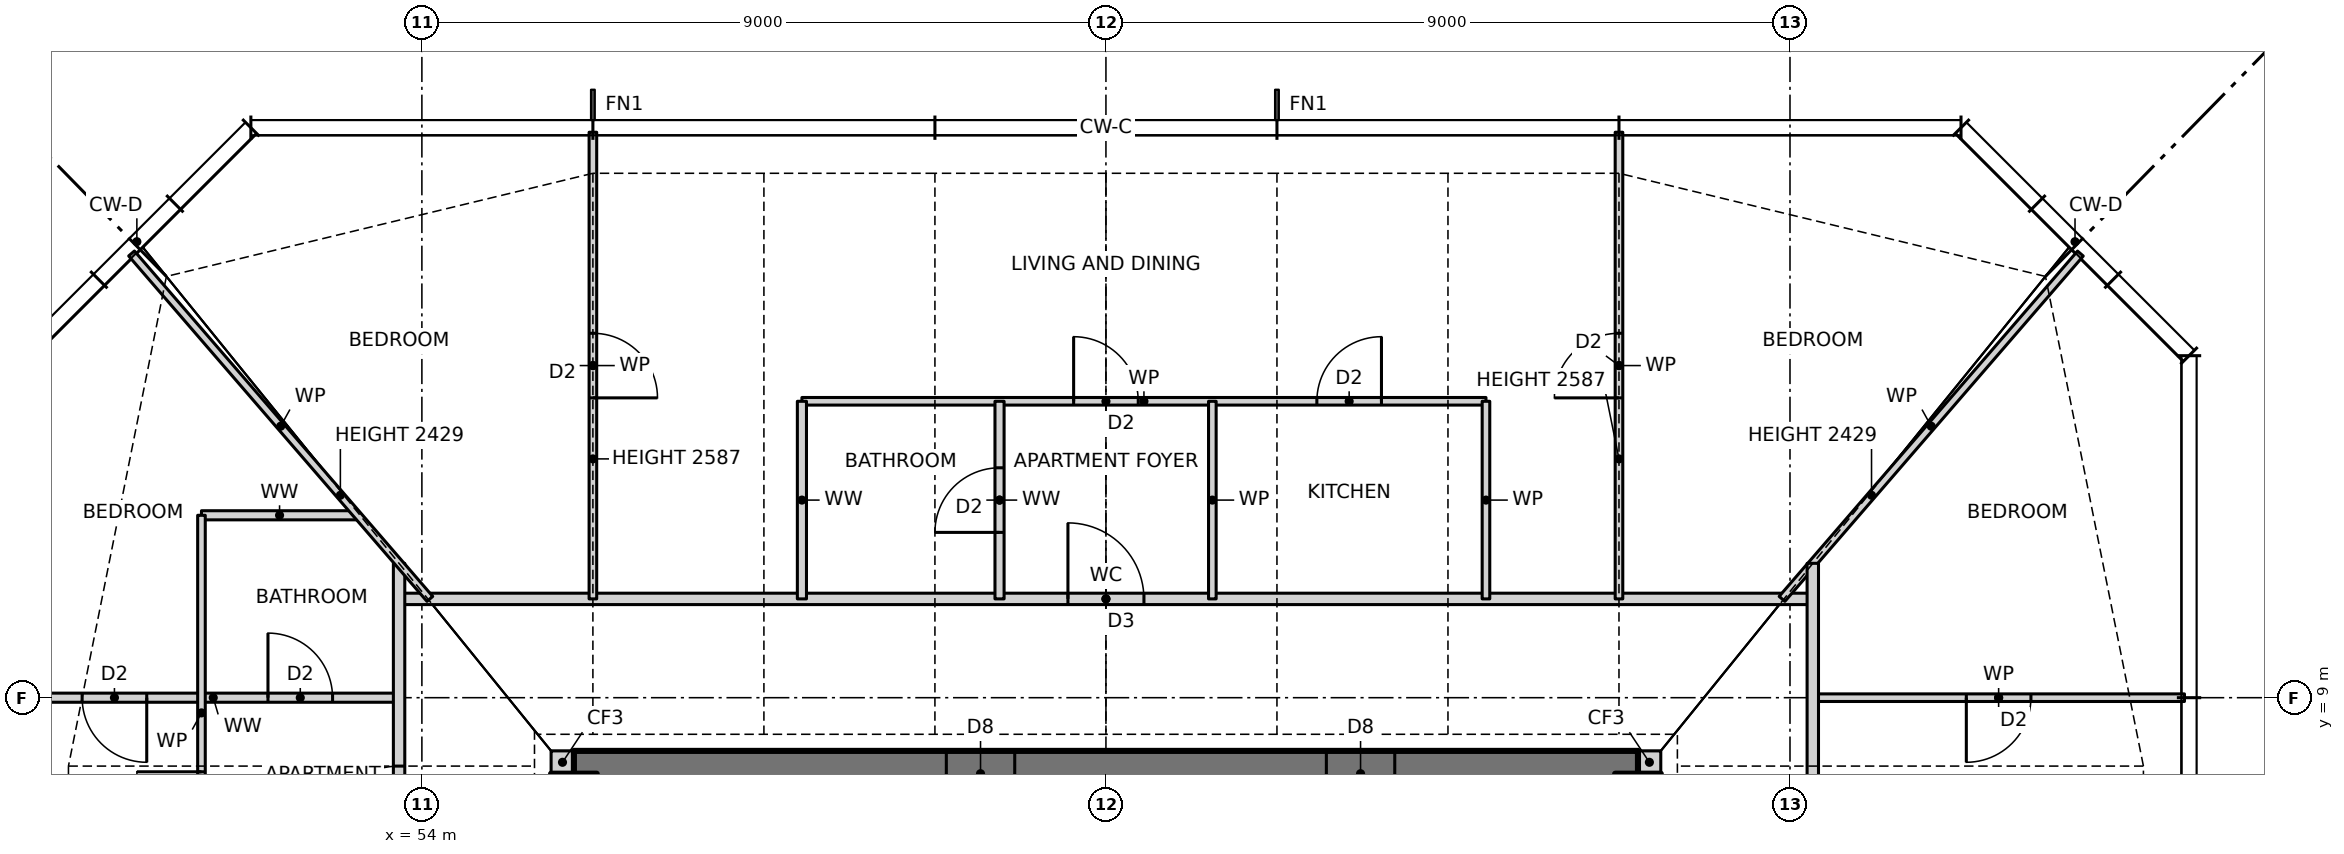
"""IFC4 building model, lengths in metres.
Left out: names, types, materials, properties, quantities, classifications, styles, units other than length and angle.
Written with IfcOpenShell. Run it as: python <this file> out.ifc"""

import sys

from ifc_helpers import new_model, si_unit, direction, frame, frame_2d, origin, place, context, subcontext, project, spatial, rectangle, extrude, element, fill, save


model = new_model("IFC4")
c1 = context("Model", 3, precision=1e-05, world=origin(), true_north=direction((0.0, 1.0)))
c2 = subcontext(c1, "Body", "Model", "MODEL_VIEW")
j1 = project(units=[si_unit("LENGTHUNIT", "METRE"), si_unit("PLANEANGLEUNIT", "RADIAN")], contexts=[c1])
p1 = place(None, origin())
s1 = spatial("IfcSite", under=j1, at=p1, CompositionType="ELEMENT")
p2 = place(p1, origin())
s2 = spatial("IfcBuilding", under=s1, at=p2, CompositionType="ELEMENT")
p3 = place(p2, frame((0.0, 0.0, 80.5)))
s3 = spatial("IfcBuildingStorey", under=s2, at=p3, CompositionType="ELEMENT", Elevation=80.5)
for number, where, z_axis, x_axis in (
    (1, (70.0, 8.15, 0.0), (0.0, 0.0, 1.0), (1.0, 0.0, 0.0)),
    (2, (55.7, 8.15, 0.0), (0.0, 0.0, 1.0), (1.0, 0.0, 0.0)),
):
    element("IfcWall", number, at=place(p3, frame(where, z_axis=z_axis, x_axis=x_axis)), inside=s3, PredefinedType="SOLIDWALL", context=c2, shape_type="SweptSolid", body=[
        extrude(rectangle(XDim=0.3, YDim=0.3, at=frame_2d((0.15, 0.0))), origin(), (0.0, 0.0, 1.0), 3.5),
    ])
p4 = place(p3, frame((70.0, 8.0, 0.0), z_axis=(0.0, 0.0, 1.0), x_axis=(-1.0, 0.0, 0.0)))
e3 = element("IfcWall", 3, at=p4, inside=s3, PredefinedType="SHEAR", context=c2, shape_type="SweptSolid", body=[
    extrude(rectangle(XDim=14.0, YDim=0.6, at=frame_2d((7.0, 0.0))), origin(), (0.0, 0.0, 1.0), 3.5),
])
p5 = place(p4, frame((8.2, 0.0, 0.0)))
e4 = element("IfcOpeningElement", 4, at=p5, cuts=e3, PredefinedType="OPENING", context=c2, shape_type="SweptSolid", body=[
    extrude(rectangle(XDim=0.9, YDim=2.1, at=frame_2d((0.45, 1.05))), frame((0.0, 0.31, 0.0), z_axis=(0.0, -1.0, 0.0), x_axis=(1.0, 0.0, 0.0)), (0.0, 0.0, 1.0), 0.62),
])
p6 = place(p4, frame((3.2, 0.0, 0.0)))
e5 = element("IfcOpeningElement", 5, at=p6, cuts=e3, PredefinedType="OPENING", context=c2, shape_type="SweptSolid", body=[
    extrude(rectangle(XDim=0.9, YDim=2.1, at=frame_2d((0.45, 1.05))), frame((0.0, 0.31, 0.0), z_axis=(0.0, -1.0, 0.0), x_axis=(1.0, 0.0, 0.0)), (0.0, 0.0, 1.0), 0.62),
])
p7 = place(p3, frame((48.81, 9.0, 0.0), z_axis=(0.0, 0.0, 1.0), x_axis=(1.0, 0.0, 0.0)))
e6 = element("IfcWall", 6, at=p7, inside=s3, PredefinedType="PARTITIONING", context=c2, shape_type="SweptSolid", body=[
    extrude(rectangle(XDim=4.89, YDim=0.12, at=frame_2d((2.445, 0.0))), origin(), (0.0, 0.0, 1.0), 3.27),
])
p8 = place(p7, frame((3.165, 0.0, 0.0)))
e7 = element("IfcOpeningElement", 7, at=p8, cuts=e6, PredefinedType="OPENING", context=c2, shape_type="SweptSolid", body=[
    extrude(rectangle(XDim=0.85, YDim=2.1, at=frame_2d((0.425, 1.05))), frame((0.0, 0.07, 0.0), z_axis=(0.0, -1.0, 0.0), x_axis=(1.0, 0.0, 0.0)), (0.0, 0.0, 1.0), 0.14),
])
p9 = place(p7, frame((0.72, 0.0, 0.0)))
e8 = element("IfcOpeningElement", 8, at=p9, cuts=e6, PredefinedType="OPENING", context=c2, shape_type="SweptSolid", body=[
    extrude(rectangle(XDim=0.85, YDim=2.1, at=frame_2d((0.425, 1.05))), frame((0.0, 0.07, 0.0), z_axis=(0.0, -1.0, 0.0), x_axis=(1.0, 0.0, 0.0)), (0.0, 0.0, 1.0), 0.14),
])
p10 = place(p3, frame((72.3, 9.0, 0.0), z_axis=(0.0, 0.0, 1.0), x_axis=(1.0, 0.0, 0.0)))
e9 = element("IfcWall", 9, at=p10, inside=s3, PredefinedType="PARTITIONING", context=c2, shape_type="SweptSolid", body=[
    extrude(rectangle(XDim=4.89, YDim=0.1, at=frame_2d((2.445, 0.0))), origin(), (0.0, 0.0, 1.0), 3.27),
])
p11 = place(p10, frame((2.02, 0.0, 0.0)))
e10 = element("IfcOpeningElement", 10, at=p11, cuts=e9, PredefinedType="OPENING", context=c2, shape_type="SweptSolid", body=[
    extrude(rectangle(XDim=0.85, YDim=2.1, at=frame_2d((0.425, 1.05))), frame((0.0, 0.06, 0.0), z_axis=(0.0, -1.0, 0.0), x_axis=(1.0, 0.0, 0.0)), (0.0, 0.0, 1.0), 0.12),
])
p12 = place(p3, frame((53.7, 10.3, 0.0), z_axis=(0.0, 0.0, 1.0), x_axis=(1.0, 0.0, 0.0)))
e11 = element("IfcWall", 11, at=p12, inside=s3, PredefinedType="PARTITIONING", context=c2, shape_type="SweptSolid", body=[
    extrude(rectangle(XDim=18.6, YDim=0.15, at=frame_2d((9.3, 0.0))), origin(), (0.0, 0.0, 1.0), 3.27),
])
p13 = place(p12, frame((8.8, 0.0, 0.0)))
e12 = element("IfcOpeningElement", 12, at=p13, cuts=e11, PredefinedType="OPENING", context=c2, shape_type="SweptSolid", body=[
    extrude(rectangle(XDim=1.0, YDim=2.1, at=frame_2d((0.5, 1.05))), frame((0.0, 0.085, 0.0), z_axis=(0.0, -1.0, 0.0), x_axis=(1.0, 0.0, 0.0)), (0.0, 0.0, 1.0), 0.17),
])
p14 = place(p3, frame((51.1, 11.4, 0.0), z_axis=(0.0, 0.0, 1.0), x_axis=(1.0, 0.0, 0.0)))
e13 = element("IfcWall", 13, at=p14, inside=s3, PredefinedType="PARTITIONING", context=c2, shape_type="SweptSolid", body=[
    extrude(rectangle(XDim=2.055, YDim=0.12, at=frame_2d((1.027, 0.0))), origin(), (0.0, 0.0, 1.0), 3.27),
])
p15 = place(p3, frame((59.0, 12.9, 0.0), z_axis=(0.0, 0.0, 1.0), x_axis=(1.0, 0.0, 0.0)))
e14 = element("IfcWall", 14, at=p15, inside=s3, PredefinedType="PARTITIONING", context=c2, shape_type="SweptSolid", body=[
    extrude(rectangle(XDim=9.0, YDim=0.1, at=frame_2d((4.5, 0.0))), origin(), (0.0, 0.0, 1.0), 3.27),
])
p16 = place(p15, frame((6.775, 0.0, 0.0)))
e15 = element("IfcOpeningElement", 15, at=p16, cuts=e14, PredefinedType="OPENING", context=c2, shape_type="SweptSolid", body=[
    extrude(rectangle(XDim=0.85, YDim=2.1, at=frame_2d((0.425, 1.05))), frame((0.0, 0.06, 0.0), z_axis=(0.0, -1.0, 0.0), x_axis=(1.0, 0.0, 0.0)), (0.0, 0.0, 1.0), 0.12),
])
p17 = place(p15, frame((3.575, 0.0, 0.0)))
e16 = element("IfcOpeningElement", 16, at=p17, cuts=e14, PredefinedType="OPENING", context=c2, shape_type="SweptSolid", body=[
    extrude(rectangle(XDim=0.85, YDim=2.1, at=frame_2d((0.425, 1.05))), frame((0.0, 0.06, 0.0), z_axis=(0.0, -1.0, 0.0), x_axis=(1.0, 0.0, 0.0)), (0.0, 0.0, 1.0), 0.12),
])
p18 = place(p3, frame((71.895, 10.3, 0.0), z_axis=(0.0, 0.0, 1.0), x_axis=(0.65378286253, 0.756682211144, 0.0)))
e17 = element("IfcWall", 17, at=p18, inside=s3, PredefinedType="PARTITIONING", context=c2, shape_type="SweptSolid", body=[
    extrude(rectangle(XDim=6.005, YDim=0.1, at=frame_2d((3.002, 0.0))), origin(), (0.0, 0.0, 1.0), 2.429),
])
p19 = place(p3, frame((72.3, -10.9, 0.0), z_axis=(0.0, 0.0, 1.0), x_axis=(0.0, 1.0, 0.0)))
e18 = element("IfcWall", 18, at=p19, inside=s3, PredefinedType="PARTITIONING", context=c2, shape_type="SweptSolid", body=[
    extrude(rectangle(XDim=21.668, YDim=0.15, at=frame_2d((10.834, 0.0))), origin(), (0.0, 0.0, 1.0), 3.27),
])
p20 = place(p19, frame((10.4, 0.0, 0.0)))
e19 = element("IfcOpeningElement", 19, at=p20, cuts=e18, PredefinedType="OPENING", context=c2, shape_type="SweptSolid", body=[
    extrude(rectangle(XDim=1.0, YDim=2.1, at=frame_2d((0.5, 1.05))), frame((0.0, 0.085, 0.0), z_axis=(0.0, -1.0, 0.0), x_axis=(1.0, 0.0, 0.0)), (0.0, 0.0, 1.0), 0.17),
])
p21 = place(p3, frame((69.75, 10.3, 0.0), z_axis=(0.0, 0.0, 1.0), x_axis=(0.0, 1.0, 0.0)))
e20 = element("IfcWall", 20, at=p21, inside=s3, PredefinedType="PARTITIONING", context=c2, shape_type="SweptSolid", body=[
    extrude(rectangle(XDim=6.14, YDim=0.1, at=frame_2d((3.07, 0.0))), origin(), (0.0, 0.0, 1.0), 2.587),
])
p22 = place(p21, frame((2.645, 0.0, 0.0)))
e21 = element("IfcOpeningElement", 21, at=p22, cuts=e20, PredefinedType="OPENING", context=c2, shape_type="SweptSolid", body=[
    extrude(rectangle(XDim=0.85, YDim=2.1, at=frame_2d((0.425, 1.05))), frame((0.0, 0.06, 0.0), z_axis=(0.0, -1.0, 0.0), x_axis=(1.0, 0.0, 0.0)), (0.0, 0.0, 1.0), 0.12),
])
for number, where, z_axis, x_axis in (
    (22, (68.0, 10.3, 0.0), (0.0, 0.0, 1.0), (0.0, 1.0, 0.0)),
    (23, (64.4, 10.3, 0.0), (0.0, 0.0, 1.0), (0.0, 1.0, 0.0)),
):
    element("IfcWall", number, at=place(p3, frame(where, z_axis=z_axis, x_axis=x_axis)), inside=s3, PredefinedType="PARTITIONING", context=c2, shape_type="SweptSolid", body=[
        extrude(rectangle(XDim=2.6, YDim=0.1, at=frame_2d((1.3, 0.0))), origin(), (0.0, 0.0, 1.0), 3.27),
    ])
p23 = place(p3, frame((61.6, 10.3, 0.0), z_axis=(0.0, 0.0, 1.0), x_axis=(0.0, 1.0, 0.0)))
e24 = element("IfcWall", 24, at=p23, inside=s3, PredefinedType="PARTITIONING", context=c2, shape_type="SweptSolid", body=[
    extrude(rectangle(XDim=2.6, YDim=0.12, at=frame_2d((1.3, 0.0))), origin(), (0.0, 0.0, 1.0), 3.27),
])
p24 = place(p23, frame((0.875, 0.0, 0.0)))
e25 = element("IfcOpeningElement", 25, at=p24, cuts=e24, PredefinedType="OPENING", context=c2, shape_type="SweptSolid", body=[
    extrude(rectangle(XDim=0.85, YDim=2.1, at=frame_2d((0.425, 1.05))), frame((0.0, 0.07, 0.0), z_axis=(0.0, -1.0, 0.0), x_axis=(1.0, 0.0, 0.0)), (0.0, 0.0, 1.0), 0.14),
])
p25 = place(p3, frame((59.0, 10.3, 0.0), z_axis=(0.0, 0.0, 1.0), x_axis=(0.0, 1.0, 0.0)))
e26 = element("IfcWall", 26, at=p25, inside=s3, PredefinedType="PARTITIONING", context=c2, shape_type="SweptSolid", body=[
    extrude(rectangle(XDim=2.6, YDim=0.12, at=frame_2d((1.3, 0.0))), origin(), (0.0, 0.0, 1.0), 3.27),
])
p26 = place(p3, frame((56.25, 10.3, 0.0), z_axis=(0.0, 0.0, 1.0), x_axis=(0.0, 1.0, 0.0)))
e27 = element("IfcWall", 27, at=p26, inside=s3, PredefinedType="PARTITIONING", context=c2, shape_type="SweptSolid", body=[
    extrude(rectangle(XDim=6.14, YDim=0.1, at=frame_2d((3.07, 0.0))), origin(), (0.0, 0.0, 1.0), 2.587),
])
p27 = place(p26, frame((2.645, 0.0, 0.0)))
e28 = element("IfcOpeningElement", 28, at=p27, cuts=e27, PredefinedType="OPENING", context=c2, shape_type="SweptSolid", body=[
    extrude(rectangle(XDim=0.85, YDim=2.1, at=frame_2d((0.425, 1.05))), frame((0.0, 0.06, 0.0), z_axis=(0.0, -1.0, 0.0), x_axis=(1.0, 0.0, 0.0)), (0.0, 0.0, 1.0), 0.12),
])
p28 = place(p3, frame((53.7, -10.9, 0.0), z_axis=(0.0, 0.0, 1.0), x_axis=(0.0, 1.0, 0.0)))
e29 = element("IfcWall", 29, at=p28, inside=s3, PredefinedType="PARTITIONING", context=c2, shape_type="SweptSolid", body=[
    extrude(rectangle(XDim=21.668, YDim=0.15, at=frame_2d((10.834, 0.0))), origin(), (0.0, 0.0, 1.0), 3.27),
])
p29 = place(p28, frame((18.0, 0.0, 0.0)))
e30 = element("IfcOpeningElement", 30, at=p29, cuts=e29, PredefinedType="OPENING", context=c2, shape_type="SweptSolid", body=[
    extrude(rectangle(XDim=1.0, YDim=2.1, at=frame_2d((0.5, 1.05))), frame((0.0, 0.085, 0.0), z_axis=(0.0, -1.0, 0.0), x_axis=(1.0, 0.0, 0.0)), (0.0, 0.0, 1.0), 0.17),
])
p30 = place(p28, frame((5.4, 0.0, 0.0)))
e31 = element("IfcOpeningElement", 31, at=p30, cuts=e29, PredefinedType="OPENING", context=c2, shape_type="SweptSolid", body=[
    extrude(rectangle(XDim=1.0, YDim=2.1, at=frame_2d((0.5, 1.05))), frame((0.0, 0.085, 0.0), z_axis=(0.0, -1.0, 0.0), x_axis=(1.0, 0.0, 0.0)), (0.0, 0.0, 1.0), 0.17),
])
p31 = place(p3, frame((51.1, 6.2, 0.0), z_axis=(0.0, 0.0, 1.0), x_axis=(0.0, 1.0, 0.0)))
e32 = element("IfcWall", 32, at=p31, inside=s3, PredefinedType="PARTITIONING", context=c2, shape_type="SweptSolid", body=[
    extrude(rectangle(XDim=5.2, YDim=0.1, at=frame_2d((2.6, 0.0))), origin(), (0.0, 0.0, 1.0), 3.27),
])
p32 = place(p31, frame((0.975, 0.0, 0.0)))
e33 = element("IfcOpeningElement", 33, at=p32, cuts=e32, PredefinedType="OPENING", context=c2, shape_type="SweptSolid", body=[
    extrude(rectangle(XDim=0.85, YDim=2.1, at=frame_2d((0.425, 1.05))), frame((0.0, 0.06, 0.0), z_axis=(0.0, -1.0, 0.0), x_axis=(1.0, 0.0, 0.0)), (0.0, 0.0, 1.0), 0.12),
])
p33 = place(p3, frame((54.105, 10.3, 0.0), z_axis=(0.0, 0.0, 1.0), x_axis=(-0.653606109319, 0.756834892074, 0.0)))
e34 = element("IfcWall", 34, at=p33, inside=s3, PredefinedType="PARTITIONING", context=c2, shape_type="SweptSolid", body=[
    extrude(rectangle(XDim=6.005, YDim=0.1, at=frame_2d((3.002, 0.0))), origin(), (0.0, 0.0, 1.0), 2.429),
])
p34 = place(p11, frame((0.85, 0.0, 0.0), z_axis=(0.0, 0.0, 1.0), x_axis=(-1.0, 0.0, 0.0)))
e35 = element("IfcDoor", 35, at=p34, inside=s3, OperationType="SINGLE_SWING_RIGHT", PredefinedType="DOOR", context=c2, shape_type="SweptSolid", body=[
    extrude(rectangle(XDim=0.85, YDim=2.1, at=frame_2d((0.425, 1.05))), frame((0.0, 0.025, 0.0), z_axis=(0.0, -1.0, 0.0), x_axis=(1.0, 0.0, 0.0)), (0.0, 0.0, 1.0), 0.05),
])
fill(e10, e35)
p35 = place(p16, origin())
e36 = element("IfcDoor", 36, at=p35, inside=s3, OperationType="SINGLE_SWING_RIGHT", PredefinedType="DOOR", context=c2, shape_type="SweptSolid", body=[
    extrude(rectangle(XDim=0.85, YDim=2.1, at=frame_2d((0.425, 1.05))), frame((0.0, 0.025, 0.0), z_axis=(0.0, -1.0, 0.0), x_axis=(1.0, 0.0, 0.0)), (0.0, 0.0, 1.0), 0.05),
])
fill(e15, e36)
p36 = place(p13, origin())
e37 = element("IfcDoor", 37, at=p36, inside=s3, OperationType="SINGLE_SWING_LEFT", PredefinedType="DOOR", context=c2, shape_type="SweptSolid", body=[
    extrude(rectangle(XDim=1.0, YDim=2.1, at=frame_2d((0.5, 1.05))), frame((0.0, 0.025, 0.0), z_axis=(0.0, -1.0, 0.0), x_axis=(1.0, 0.0, 0.0)), (0.0, 0.0, 1.0), 0.05),
])
fill(e12, e37)
p37 = place(p17, origin())
e38 = element("IfcDoor", 38, at=p37, inside=s3, OperationType="SINGLE_SWING_LEFT", PredefinedType="DOOR", context=c2, shape_type="SweptSolid", body=[
    extrude(rectangle(XDim=0.85, YDim=2.1, at=frame_2d((0.425, 1.05))), frame((0.0, 0.025, 0.0), z_axis=(0.0, -1.0, 0.0), x_axis=(1.0, 0.0, 0.0)), (0.0, 0.0, 1.0), 0.05),
])
fill(e16, e38)
p38 = place(p24, origin())
e39 = element("IfcDoor", 39, at=p38, inside=s3, OperationType="SINGLE_SWING_LEFT", PredefinedType="DOOR", context=c2, shape_type="SweptSolid", body=[
    extrude(rectangle(XDim=0.85, YDim=2.1, at=frame_2d((0.425, 1.05))), frame((0.0, 0.025, 0.0), z_axis=(0.0, -1.0, 0.0), x_axis=(1.0, 0.0, 0.0)), (0.0, 0.0, 1.0), 0.05),
])
fill(e25, e39)
p39 = place(p22, origin())
e40 = element("IfcDoor", 40, at=p39, inside=s3, OperationType="SINGLE_SWING_LEFT", PredefinedType="DOOR", context=c2, shape_type="SweptSolid", body=[
    extrude(rectangle(XDim=0.85, YDim=2.1, at=frame_2d((0.425, 1.05))), frame((0.0, 0.025, 0.0), z_axis=(0.0, -1.0, 0.0), x_axis=(1.0, 0.0, 0.0)), (0.0, 0.0, 1.0), 0.05),
])
fill(e21, e40)
p40 = place(p27, frame((0.85, 0.0, 0.0), z_axis=(0.0, 0.0, 1.0), x_axis=(-1.0, 0.0, 0.0)))
e41 = element("IfcDoor", 41, at=p40, inside=s3, OperationType="SINGLE_SWING_RIGHT", PredefinedType="DOOR", context=c2, shape_type="SweptSolid", body=[
    extrude(rectangle(XDim=0.85, YDim=2.1, at=frame_2d((0.425, 1.05))), frame((0.0, 0.025, 0.0), z_axis=(0.0, -1.0, 0.0), x_axis=(1.0, 0.0, 0.0)), (0.0, 0.0, 1.0), 0.05),
])
fill(e28, e41)
p41 = place(p29, origin())
e42 = element("IfcDoor", 42, at=p41, inside=s3, OperationType="SINGLE_SWING_LEFT", PredefinedType="DOOR", context=c2, shape_type="SweptSolid", body=[
    extrude(rectangle(XDim=1.0, YDim=2.1, at=frame_2d((0.5, 1.05))), frame((0.0, 0.025, 0.0), z_axis=(0.0, -1.0, 0.0), x_axis=(1.0, 0.0, 0.0)), (0.0, 0.0, 1.0), 0.05),
])
fill(e30, e42)
p42 = place(p32, origin())
e43 = element("IfcDoor", 43, at=p42, inside=s3, OperationType="SINGLE_SWING_RIGHT", PredefinedType="DOOR", context=c2, shape_type="SweptSolid", body=[
    extrude(rectangle(XDim=0.85, YDim=2.1, at=frame_2d((0.425, 1.05))), frame((0.0, 0.025, 0.0), z_axis=(0.0, -1.0, 0.0), x_axis=(1.0, 0.0, 0.0)), (0.0, 0.0, 1.0), 0.05),
])
fill(e33, e43)
p43 = place(p8, origin())
e44 = element("IfcDoor", 44, at=p43, inside=s3, OperationType="SINGLE_SWING_LEFT", PredefinedType="DOOR", context=c2, shape_type="SweptSolid", body=[
    extrude(rectangle(XDim=0.85, YDim=2.1, at=frame_2d((0.425, 1.05))), frame((0.0, 0.025, 0.0), z_axis=(0.0, -1.0, 0.0), x_axis=(1.0, 0.0, 0.0)), (0.0, 0.0, 1.0), 0.05),
])
fill(e7, e44)
p44 = place(p9, frame((0.85, 0.0, 0.0), z_axis=(0.0, 0.0, 1.0), x_axis=(-1.0, 0.0, 0.0)))
e45 = element("IfcDoor", 45, at=p44, inside=s3, OperationType="SINGLE_SWING_LEFT", PredefinedType="DOOR", context=c2, shape_type="SweptSolid", body=[
    extrude(rectangle(XDim=0.85, YDim=2.1, at=frame_2d((0.425, 1.05))), frame((0.0, 0.025, 0.0), z_axis=(0.0, -1.0, 0.0), x_axis=(1.0, 0.0, 0.0)), (0.0, 0.0, 1.0), 0.05),
])
fill(e8, e45)
p45 = place(p5, origin())
e46 = element("IfcDoor", 46, at=p45, inside=s3, OperationType="SINGLE_SWING_RIGHT", PredefinedType="DOOR", context=c2, shape_type="SweptSolid", body=[
    extrude(rectangle(XDim=0.9, YDim=2.1, at=frame_2d((0.45, 1.05))), frame((0.0, 0.025, 0.0), z_axis=(0.0, -1.0, 0.0), x_axis=(1.0, 0.0, 0.0)), (0.0, 0.0, 1.0), 0.05),
])
fill(e4, e46)
p46 = place(p6, origin())
e47 = element("IfcDoor", 47, at=p46, inside=s3, OperationType="SINGLE_SWING_RIGHT", PredefinedType="DOOR", context=c2, shape_type="SweptSolid", body=[
    extrude(rectangle(XDim=0.9, YDim=2.1, at=frame_2d((0.45, 1.05))), frame((0.0, 0.025, 0.0), z_axis=(0.0, -1.0, 0.0), x_axis=(1.0, 0.0, 0.0)), (0.0, 0.0, 1.0), 0.05),
])
fill(e5, e47)
save(model, sys.argv[1])
